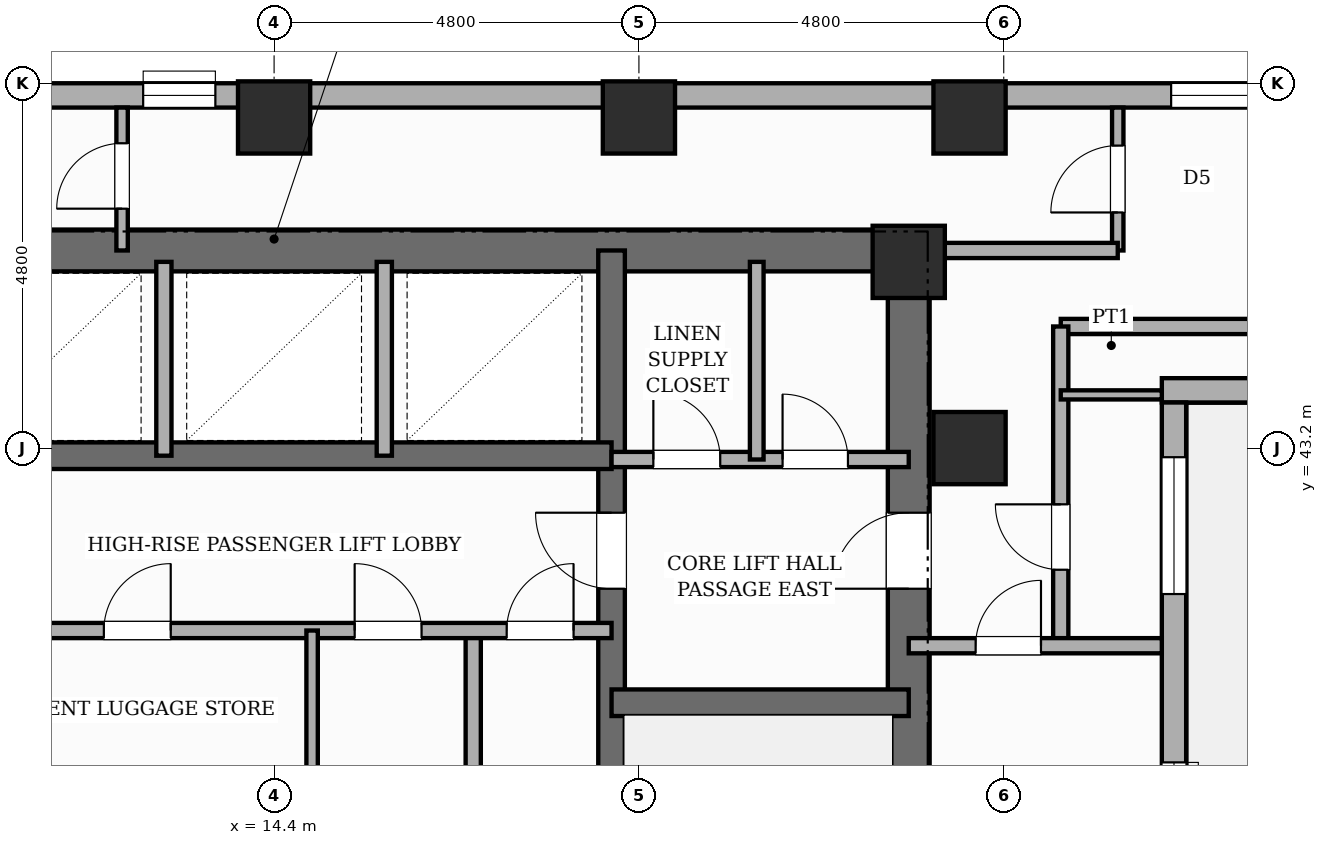
"""IFC4 building model, lengths in metres.
Left out: names, types, materials, properties, quantities, classifications, styles, units other than length and angle.
Written with IfcOpenShell. Run it as: python <this file> out.ifc"""

import sys

from ifc_helpers import new_model, si_unit, direction, frame, frame_2d, origin, origin_2d, place, context, subcontext, project, spatial, rectangle, extrude, element, fill, save


model = new_model("IFC4")
c1 = context("Model", 3, precision=1e-05, world=origin(), true_north=direction((0.0, 1.0)))
c2 = subcontext(c1, "Body", "Model", "MODEL_VIEW")
j1 = project(units=[si_unit("LENGTHUNIT", "METRE"), si_unit("PLANEANGLEUNIT", "RADIAN")], contexts=[c1])
p1 = place(None, origin())
s1 = spatial("IfcSite", under=j1, at=p1, CompositionType="ELEMENT")
p2 = place(p1, origin())
s2 = spatial("IfcBuilding", under=s1, at=p2, CompositionType="ELEMENT")
p3 = place(p2, frame((0.0, 0.0, 154.0)))
s3 = spatial("IfcBuildingStorey", under=s2, at=p3, CompositionType="ELEMENT", Elevation=154.0)
p4 = place(p3, frame((22.75, 30.625, 0.0), z_axis=(0.0, 0.0, 1.0), x_axis=(0.0, 1.0, 0.0)))
e1 = element("IfcWall", 1, at=p4, inside=s3, PredefinedType="SHEAR", context=c2, shape_type="SweptSolid", body=[
    extrude(rectangle(XDim=15.45, YDim=0.55, at=frame_2d((7.725, 0.0))), origin(), (0.0, 0.0, 1.0), 3.6),
])
p5 = place(p4, frame((10.725, 0.0, 0.0)))
e2 = element("IfcOpeningElement", 2, at=p5, cuts=e1, PredefinedType="OPENING", context=c2, shape_type="SweptSolid", body=[
    extrude(rectangle(XDim=1.0, YDim=2.15, at=frame_2d((0.5, 1.075))), frame((0.0, 0.285, 0.0), z_axis=(0.0, -1.0, 0.0), x_axis=(1.0, 0.0, 0.0)), (0.0, 0.0, 1.0), 0.57),
])
p6 = place(p3, frame((6.05, 45.8, 0.0), z_axis=(0.0, 0.0, 1.0), x_axis=(1.0, 0.0, 0.0)))
e3 = element("IfcWall", 3, at=p6, inside=s3, PredefinedType="SHEAR", context=c2, shape_type="SweptSolid", body=[
    extrude(rectangle(XDim=16.7, YDim=0.55, at=frame_2d((8.35, 0.0))), origin(), (0.0, 0.0, 1.0), 3.6),
])
p7 = place(p3, frame((18.84, 30.9, 0.0), z_axis=(0.0, 0.0, 1.0), x_axis=(0.0, 1.0, 0.0)))
e4 = element("IfcWall", 4, at=p7, inside=s3, PredefinedType="SHEAR", context=c2, shape_type="SweptSolid", body=[
    extrude(rectangle(XDim=14.9, YDim=0.35, at=frame_2d((7.45, 0.0))), origin(), (0.0, 0.0, 1.0), 3.6),
])
p8 = place(p7, frame((0.65, 0.0, 0.0)))
e5 = element("IfcOpeningElement", 5, at=p8, cuts=e4, PredefinedType="OPENING", context=c2, shape_type="SweptSolid", body=[
    extrude(rectangle(XDim=0.95, YDim=2.1, at=frame_2d((0.475, 1.05))), frame((0.0, 0.185, 0.0), z_axis=(0.0, -1.0, 0.0), x_axis=(1.0, 0.0, 0.0)), (0.0, 0.0, 1.0), 0.37),
])
p9 = place(p7, frame((10.45, 0.0, 0.0)))
e6 = element("IfcOpeningElement", 6, at=p9, cuts=e4, PredefinedType="OPENING", context=c2, shape_type="SweptSolid", body=[
    extrude(rectangle(XDim=1.0, YDim=2.15, at=frame_2d((0.5, 1.075))), frame((0.0, 0.185, 0.0), z_axis=(0.0, -1.0, 0.0), x_axis=(1.0, 0.0, 0.0)), (0.0, 0.0, 1.0), 0.37),
])
p10 = place(p3, frame((18.84, 39.85, 0.0), z_axis=(0.0, 0.0, 1.0), x_axis=(1.0, 0.0, 0.0)))
e7 = element("IfcWall", 7, at=p10, inside=s3, PredefinedType="SHEAR", context=c2, shape_type="SweptSolid", body=[
    extrude(rectangle(XDim=3.91, YDim=0.35, at=frame_2d((1.955, 0.0))), origin(), (0.0, 0.0, 1.0), 3.6),
])
p11 = place(p3, frame((9.96, 43.1, 0.0), z_axis=(0.0, 0.0, 1.0), x_axis=(1.0, 0.0, 0.0)))
e8 = element("IfcWall", 8, at=p11, inside=s3, PredefinedType="SHEAR", context=c2, shape_type="SweptSolid", body=[
    extrude(rectangle(XDim=8.88, YDim=0.35, at=frame_2d((4.44, 0.0))), origin(), (0.0, 0.0, 1.0), 3.6),
])
for number, where, z_axis, x_axis in (
    (9, (14.4, 47.55, 0.0), (0.0, 0.0, 1.0), (1.0, 0.0, 0.0)),
    (10, (19.2, 47.55, 0.0), (0.0, 0.0, 1.0), (1.0, 0.0, 0.0)),
    (11, (22.75, 45.65, 0.0), (0.0, 0.0, 1.0), (1.0, 0.0, 0.0)),
    (12, (23.55, 43.2, 0.0), (0.0, 0.0, 1.0), (1.0, 0.0, 0.0)),
    (13, (23.55, 47.55, 0.0), (0.0, 0.0, 1.0), (1.0, 0.0, 0.0)),
):
    element("IfcColumn", number, at=place(p3, frame(where, z_axis=z_axis, x_axis=x_axis)), inside=s3, PredefinedType="COLUMN", context=c2, shape_type="SweptSolid", body=[
        extrude(rectangle(XDim=0.95, YDim=0.95, at=origin_2d()), origin(), (0.0, 0.0, 1.0), 3.6),
    ])
p12 = place(p3, frame((7.2, 47.84, 0.0), z_axis=(0.0, 0.0, 1.0), x_axis=(1.0, 0.0, 0.0)))
e14 = element("IfcWall", 14, at=p12, inside=s3, PredefinedType="STANDARD", context=c2, shape_type="SweptSolid", body=[
    extrude(rectangle(XDim=43.2, YDim=0.32, at=frame_2d((21.6, 0.0))), origin(), (0.0, 0.0, 1.0), 2.54),
])
p13 = place(p12, frame((19.002, 0.0, 0.65)))
e15 = element("IfcOpeningElement", 15, at=p13, cuts=e14, PredefinedType="OPENING", context=c2, shape_type="SweptSolid", body=[
    extrude(rectangle(XDim=1.4, YDim=1.1, at=frame_2d((0.7, 0.55))), frame((0.0, 0.17, 0.0), z_axis=(0.0, -1.0, 0.0), x_axis=(1.0, 0.0, 0.0)), (0.0, 0.0, 1.0), 0.34),
])
p14 = place(p12, frame((0.282, 0.0, 0.65)))
e16 = element("IfcOpeningElement", 16, at=p14, cuts=e14, PredefinedType="OPENING", context=c2, shape_type="SweptSolid", body=[
    extrude(rectangle(XDim=1.4, YDim=1.1, at=frame_2d((0.7, 0.55))), frame((0.0, 0.17, 0.0), z_axis=(0.0, -1.0, 0.0), x_axis=(1.0, 0.0, 0.0)), (0.0, 0.0, 1.0), 0.34),
])
p15 = place(p12, frame((5.478, 0.0, 0.45)))
e17 = element("IfcOpeningElement", 17, at=p15, cuts=e14, PredefinedType="OPENING", context=c2, shape_type="SweptSolid", body=[
    extrude(rectangle(XDim=0.95, YDim=1.8, at=frame_2d((0.475, 0.9))), frame((0.0, 0.17, 0.0), z_axis=(0.0, -1.0, 0.0), x_axis=(1.0, 0.0, 0.0)), (0.0, 0.0, 1.0), 0.34),
])
p16 = place(p3, frame((38.4, 43.96, 0.0), z_axis=(0.0, 0.0, 1.0), x_axis=(-1.0, 0.0, 0.0)))
e18 = element("IfcWall", 18, at=p16, inside=s3, PredefinedType="STANDARD", context=c2, shape_type="SweptSolid", body=[
    extrude(rectangle(XDim=12.32, YDim=0.32, at=frame_2d((6.16, 0.0))), origin(), (0.0, 0.0, 1.0), 3.36),
])
p17 = place(p16, frame((5.26, 0.0, 0.8)))
e19 = element("IfcOpeningElement", 19, at=p17, cuts=e18, PredefinedType="OPENING", context=c2, shape_type="SweptSolid", body=[
    extrude(rectangle(XDim=1.8, YDim=2.1, at=frame_2d((0.9, 1.05))), frame((0.0, 0.17, 0.0), z_axis=(0.0, -1.0, 0.0), x_axis=(1.0, 0.0, 0.0)), (0.0, 0.0, 1.0), 0.34),
])
p18 = place(p3, frame((26.24, 43.8, 0.0), z_axis=(0.0, 0.0, 1.0), x_axis=(0.0, -1.0, 0.0)))
e20 = element("IfcWall", 20, at=p18, inside=s3, PredefinedType="STANDARD", context=c2, shape_type="SweptSolid", body=[
    extrude(rectangle(XDim=15.0, YDim=0.32, at=frame_2d((7.5, 0.0))), origin(), (0.0, 0.0, 1.0), 3.36),
])
p19 = place(p18, frame((8.15, 0.0, 0.0)))
e21 = element("IfcOpeningElement", 21, at=p19, cuts=e20, PredefinedType="OPENING", context=c2, shape_type="SweptSolid", body=[
    extrude(rectangle(XDim=1.3, YDim=2.2, at=frame_2d((0.65, 1.1))), frame((0.0, 0.17, 0.0), z_axis=(0.0, -1.0, 0.0), x_axis=(1.0, 0.0, 0.0)), (0.0, 0.0, 1.0), 0.34),
])
p20 = place(p18, frame((4.735, 0.0, 0.8)))
e22 = element("IfcOpeningElement", 22, at=p20, cuts=e20, PredefinedType="OPENING", context=c2, shape_type="SweptSolid", body=[
    extrude(rectangle(XDim=1.8, YDim=2.1, at=frame_2d((0.9, 1.05))), frame((0.0, 0.17, 0.0), z_axis=(0.0, -1.0, 0.0), x_axis=(1.0, 0.0, 0.0)), (0.0, 0.0, 1.0), 0.34),
])
p21 = place(p18, frame((0.72, 0.0, 0.8)))
e23 = element("IfcOpeningElement", 23, at=p21, cuts=e20, PredefinedType="OPENING", context=c2, shape_type="SweptSolid", body=[
    extrude(rectangle(XDim=1.8, YDim=2.1, at=frame_2d((0.9, 1.05))), frame((0.0, 0.17, 0.0), z_axis=(0.0, -1.0, 0.0), x_axis=(1.0, 0.0, 0.0)), (0.0, 0.0, 1.0), 0.34),
])
p22 = place(p3, frame((17.02, 35.65, 0.0), z_axis=(0.0, 0.0, 1.0), x_axis=(0.0, 1.0, 0.0)))
e24 = element("IfcWall", 24, at=p22, inside=s3, PredefinedType="POLYGONAL", context=c2, shape_type="SweptSolid", body=[
    extrude(rectangle(XDim=5.15, YDim=0.2, at=frame_2d((2.575, 0.0))), origin(), (0.0, 0.0, 1.0), 3.36),
])
p23 = place(p3, frame((9.96, 40.8, 0.0), z_axis=(0.0, 0.0, 1.0), x_axis=(1.0, 0.0, 0.0)))
e25 = element("IfcWall", 25, at=p23, inside=s3, PredefinedType="POLYGONAL", context=c2, shape_type="SweptSolid", body=[
    extrude(rectangle(XDim=8.88, YDim=0.2, at=frame_2d((4.44, 0.0))), origin(), (0.0, 0.0, 1.0), 3.36),
])
p24 = place(p23, frame((7.5, 0.0, 0.0)))
e26 = element("IfcOpeningElement", 26, at=p24, cuts=e25, PredefinedType="OPENING", context=c2, shape_type="SweptSolid", body=[
    extrude(rectangle(XDim=0.88, YDim=2.1, at=frame_2d((0.44, 1.05))), frame((0.0, 0.11, 0.0), z_axis=(0.0, -1.0, 0.0), x_axis=(1.0, 0.0, 0.0)), (0.0, 0.0, 1.0), 0.22),
])
p25 = place(p23, frame((2.2, 0.0, 0.0)))
e27 = element("IfcOpeningElement", 27, at=p25, cuts=e25, PredefinedType="OPENING", context=c2, shape_type="SweptSolid", body=[
    extrude(rectangle(XDim=0.88, YDim=2.1, at=frame_2d((0.44, 1.05))), frame((0.0, 0.11, 0.0), z_axis=(0.0, -1.0, 0.0), x_axis=(1.0, 0.0, 0.0)), (0.0, 0.0, 1.0), 0.22),
])
p26 = place(p23, frame((5.5, 0.0, 0.0)))
e28 = element("IfcOpeningElement", 28, at=p26, cuts=e25, PredefinedType="OPENING", context=c2, shape_type="SweptSolid", body=[
    extrude(rectangle(XDim=0.88, YDim=2.1, at=frame_2d((0.44, 1.05))), frame((0.0, 0.11, 0.0), z_axis=(0.0, -1.0, 0.0), x_axis=(1.0, 0.0, 0.0)), (0.0, 0.0, 1.0), 0.22),
])
p27 = place(p3, frame((18.84, 43.05, 0.0), z_axis=(0.0, 0.0, 1.0), x_axis=(1.0, 0.0, 0.0)))
e29 = element("IfcWall", 29, at=p27, inside=s3, PredefinedType="POLYGONAL", context=c2, shape_type="SweptSolid", body=[
    extrude(rectangle(XDim=3.91, YDim=0.2, at=frame_2d((1.955, 0.0))), origin(), (0.0, 0.0, 1.0), 2.54),
])
p28 = place(p27, frame((0.55, 0.0, 0.0)))
e30 = element("IfcOpeningElement", 30, at=p28, cuts=e29, PredefinedType="OPENING", context=c2, shape_type="SweptSolid", body=[
    extrude(rectangle(XDim=0.88, YDim=2.1, at=frame_2d((0.44, 1.05))), frame((0.0, 0.11, 0.0), z_axis=(0.0, -1.0, 0.0), x_axis=(1.0, 0.0, 0.0)), (0.0, 0.0, 1.0), 0.22),
])
p29 = place(p27, frame((2.25, 0.0, 0.0)))
e31 = element("IfcOpeningElement", 31, at=p29, cuts=e29, PredefinedType="OPENING", context=c2, shape_type="SweptSolid", body=[
    extrude(rectangle(XDim=0.86, YDim=2.1, at=frame_2d((0.43, 1.05))), frame((0.0, 0.11, 0.0), z_axis=(0.0, -1.0, 0.0), x_axis=(1.0, 0.0, 0.0)), (0.0, 0.0, 1.0), 0.22),
])
for number, where, z_axis, x_axis in (
    (32, (12.95, 43.1, 0.0), (0.0, 0.0, 1.0), (0.0, 1.0, 0.0)),
    (33, (15.85, 43.1, 0.0), (0.0, 0.0, 1.0), (0.0, 1.0, 0.0)),
):
    element("IfcWall", number, at=place(p3, frame(where, z_axis=z_axis, x_axis=x_axis)), inside=s3, PredefinedType="POLYGONAL", context=c2, shape_type="SweptSolid", body=[
        extrude(rectangle(XDim=2.55, YDim=0.2, at=frame_2d((1.275, 0.0))), origin(), (0.0, 0.0, 1.0), 3.36),
    ])
p30 = place(p3, frame((14.9, 38.72, 0.0), z_axis=(0.0, 0.0, 1.0), x_axis=(0.0, 1.0, 0.0)))
e34 = element("IfcWall", 34, at=p30, inside=s3, PredefinedType="PARTITIONING", context=c2, shape_type="SweptSolid", body=[
    extrude(rectangle(XDim=2.08, YDim=0.15, at=frame_2d((1.04, 0.0))), origin(), (0.0, 0.0, 1.0), 3.36),
])
p31 = place(p3, frame((20.75, 43.05, 0.0), z_axis=(0.0, 0.0, 1.0), x_axis=(0.0, 1.0, 0.0)))
e35 = element("IfcWall", 35, at=p31, inside=s3, PredefinedType="PLUMBINGWALL", context=c2, shape_type="SweptSolid", body=[
    extrude(rectangle(XDim=2.6, YDim=0.18, at=frame_2d((1.3, 0.0))), origin(), (0.0, 0.0, 1.0), 3.36),
])
p32 = place(p3, frame((25.5, 45.8, 0.0), z_axis=(0.0, 0.0, 1.0), x_axis=(0.0, 1.0, 0.0)))
e36 = element("IfcWall", 36, at=p32, inside=s3, PredefinedType="PARTITIONING", context=c2, shape_type="SweptSolid", body=[
    extrude(rectangle(XDim=1.88, YDim=0.15, at=frame_2d((0.94, 0.0))), origin(), (0.0, 0.0, 1.0), 3.36),
])
p33 = place(p32, frame((0.5, 0.0, 0.0)))
e37 = element("IfcOpeningElement", 37, at=p33, cuts=e36, PredefinedType="OPENING", context=c2, shape_type="SweptSolid", body=[
    extrude(rectangle(XDim=0.88, YDim=2.1, at=frame_2d((0.44, 1.05))), frame((0.0, 0.085, 0.0), z_axis=(0.0, -1.0, 0.0), x_axis=(1.0, 0.0, 0.0)), (0.0, 0.0, 1.0), 0.17),
])
p34 = place(p3, frame((22.75, 45.8, 0.0), z_axis=(0.0, 0.0, 1.0), x_axis=(1.0, 0.0, 0.0)))
e38 = element("IfcWall", 38, at=p34, inside=s3, PredefinedType="PARTITIONING", context=c2, shape_type="SweptSolid", body=[
    extrude(rectangle(XDim=2.75, YDim=0.2, at=frame_2d((1.375, 0.0))), origin(), (0.0, 0.0, 1.0), 3.36),
])
p35 = place(p3, frame((12.4, 45.8, 0.0), z_axis=(0.0, 0.0, 1.0), x_axis=(0.0, 1.0, 0.0)))
e39 = element("IfcWall", 39, at=p35, inside=s3, PredefinedType="PARTITIONING", context=c2, shape_type="SweptSolid", body=[
    extrude(rectangle(XDim=1.88, YDim=0.15, at=frame_2d((0.94, 0.0))), origin(), (0.0, 0.0, 1.0), 3.36),
])
p36 = place(p35, frame((0.55, 0.0, 0.0)))
e40 = element("IfcOpeningElement", 40, at=p36, cuts=e39, PredefinedType="OPENING", context=c2, shape_type="SweptSolid", body=[
    extrude(rectangle(XDim=0.86, YDim=2.1, at=frame_2d((0.43, 1.05))), frame((0.0, 0.085, 0.0), z_axis=(0.0, -1.0, 0.0), x_axis=(1.0, 0.0, 0.0)), (0.0, 0.0, 1.0), 0.17),
])
p37 = place(p3, frame((24.75, 44.8, 0.0), z_axis=(0.0, 0.0, 1.0), x_axis=(1.0, 0.0, 0.0)))
e41 = element("IfcWall", 41, at=p37, inside=s3, PredefinedType="PARTITIONING", context=c2, shape_type="SweptSolid", body=[
    extrude(rectangle(XDim=17.3, YDim=0.2, at=frame_2d((8.65, 0.0))), origin(), (0.0, 0.0, 1.0), 3.36),
])
p38 = place(p37, frame((6.2, 0.0, 0.0)))
e42 = element("IfcOpeningElement", 42, at=p38, cuts=e41, PredefinedType="OPENING", context=c2, shape_type="SweptSolid", body=[
    extrude(rectangle(XDim=0.95, YDim=2.15, at=frame_2d((0.475, 1.075))), frame((0.0, 0.11, 0.0), z_axis=(0.0, -1.0, 0.0), x_axis=(1.0, 0.0, 0.0)), (0.0, 0.0, 1.0), 0.22),
])
p39 = place(p3, frame((24.75, 40.6, 0.0), z_axis=(0.0, 0.0, 1.0), x_axis=(0.0, 1.0, 0.0)))
e43 = element("IfcWall", 43, at=p39, inside=s3, PredefinedType="PARTITIONING", context=c2, shape_type="SweptSolid", body=[
    extrude(rectangle(XDim=4.2, YDim=0.2, at=frame_2d((2.1, 0.0))), origin(), (0.0, 0.0, 1.0), 3.36),
])
p40 = place(p39, frame((1.0, 0.0, 0.0)))
e44 = element("IfcOpeningElement", 44, at=p40, cuts=e43, PredefinedType="OPENING", context=c2, shape_type="SweptSolid", body=[
    extrude(rectangle(XDim=0.86, YDim=2.1, at=frame_2d((0.43, 1.05))), frame((0.0, 0.11, 0.0), z_axis=(0.0, -1.0, 0.0), x_axis=(1.0, 0.0, 0.0)), (0.0, 0.0, 1.0), 0.22),
])
p41 = place(p3, frame((24.75, 43.9, 0.0), z_axis=(0.0, 0.0, 1.0), x_axis=(1.0, 0.0, 0.0)))
e45 = element("IfcWall", 45, at=p41, inside=s3, PredefinedType="PARTITIONING", context=c2, shape_type="SweptSolid", body=[
    extrude(rectangle(XDim=1.33, YDim=0.12, at=frame_2d((0.665, 0.0))), origin(), (0.0, 0.0, 1.0), 3.36),
])
p42 = place(p3, frame((22.75, 40.6, 0.0), z_axis=(0.0, 0.0, 1.0), x_axis=(1.0, 0.0, 0.0)))
e46 = element("IfcWall", 46, at=p42, inside=s3, PredefinedType="PARTITIONING", context=c2, shape_type="SweptSolid", body=[
    extrude(rectangle(XDim=3.33, YDim=0.2, at=frame_2d((1.665, 0.0))), origin(), (0.0, 0.0, 1.0), 3.36),
])
p43 = place(p42, frame((0.88, 0.0, 0.0)))
e47 = element("IfcOpeningElement", 47, at=p43, cuts=e46, PredefinedType="OPENING", context=c2, shape_type="SweptSolid", body=[
    extrude(rectangle(XDim=0.86, YDim=2.1, at=frame_2d((0.43, 1.05))), frame((0.0, 0.11, 0.0), z_axis=(0.0, -1.0, 0.0), x_axis=(1.0, 0.0, 0.0)), (0.0, 0.0, 1.0), 0.22),
])
p44 = place(p13, origin())
e48 = element("IfcWindow", 48, at=p44, inside=s3, PartitioningType="SINGLE_PANEL", PredefinedType="WINDOW", context=c2, shape_type="SweptSolid", body=[
    extrude(rectangle(XDim=1.4, YDim=1.1, at=frame_2d((0.7, 0.55))), frame((0.0, 0.03, 0.0), z_axis=(0.0, -1.0, 0.0), x_axis=(1.0, 0.0, 0.0)), (0.0, 0.0, 1.0), 0.06),
])
fill(e15, e48)
p45 = place(p15, origin())
e49 = element("IfcWindow", 49, at=p45, inside=s3, PartitioningType="SINGLE_PANEL", PredefinedType="WINDOW", context=c2, shape_type="SweptSolid", body=[
    extrude(rectangle(XDim=0.95, YDim=1.8, at=frame_2d((0.475, 0.9))), frame((0.0, 0.03, 0.0), z_axis=(0.0, -1.0, 0.0), x_axis=(1.0, 0.0, 0.0)), (0.0, 0.0, 1.0), 0.06),
])
fill(e17, e49)
p46 = place(p20, origin())
e50 = element("IfcWindow", 50, at=p46, inside=s3, PartitioningType="SINGLE_PANEL", PredefinedType="WINDOW", context=c2, shape_type="SweptSolid", body=[
    extrude(rectangle(XDim=1.8, YDim=2.1, at=frame_2d((0.9, 1.05))), frame((0.0, 0.03, 0.0), z_axis=(0.0, -1.0, 0.0), x_axis=(1.0, 0.0, 0.0)), (0.0, 0.0, 1.0), 0.06),
])
fill(e22, e50)
p47 = place(p21, origin())
e51 = element("IfcWindow", 51, at=p47, inside=s3, PartitioningType="SINGLE_PANEL", PredefinedType="WINDOW", context=c2, shape_type="SweptSolid", body=[
    extrude(rectangle(XDim=1.8, YDim=2.1, at=frame_2d((0.9, 1.05))), frame((0.0, 0.03, 0.0), z_axis=(0.0, -1.0, 0.0), x_axis=(1.0, 0.0, 0.0)), (0.0, 0.0, 1.0), 0.06),
])
fill(e23, e51)
p48 = place(p24, origin())
e52 = element("IfcDoor", 52, at=p48, inside=s3, OperationType="SINGLE_SWING_RIGHT", PredefinedType="DOOR", context=c2, shape_type="SweptSolid", body=[
    extrude(rectangle(XDim=0.88, YDim=2.1, at=frame_2d((0.44, 1.05))), frame((0.0, 0.025, 0.0), z_axis=(0.0, -1.0, 0.0), x_axis=(1.0, 0.0, 0.0)), (0.0, 0.0, 1.0), 0.05),
])
fill(e26, e52)
p49 = place(p9, origin())
e53 = element("IfcDoor", 53, at=p49, inside=s3, OperationType="SINGLE_SWING_RIGHT", PredefinedType="DOOR", context=c2, shape_type="SweptSolid", body=[
    extrude(rectangle(XDim=1.0, YDim=2.15, at=frame_2d((0.5, 1.075))), frame((0.0, 0.025, 0.0), z_axis=(0.0, -1.0, 0.0), x_axis=(1.0, 0.0, 0.0)), (0.0, 0.0, 1.0), 0.05),
])
fill(e6, e53)
p50 = place(p5, origin())
e54 = element("IfcDoor", 54, at=p50, inside=s3, OperationType="SINGLE_SWING_LEFT", PredefinedType="DOOR", context=c2, shape_type="SweptSolid", body=[
    extrude(rectangle(XDim=1.0, YDim=2.15, at=frame_2d((0.5, 1.075))), frame((0.0, 0.025, 0.0), z_axis=(0.0, -1.0, 0.0), x_axis=(1.0, 0.0, 0.0)), (0.0, 0.0, 1.0), 0.05),
])
fill(e2, e54)
p51 = place(p25, origin())
e55 = element("IfcDoor", 55, at=p51, inside=s3, OperationType="SINGLE_SWING_RIGHT", PredefinedType="DOOR", context=c2, shape_type="SweptSolid", body=[
    extrude(rectangle(XDim=0.88, YDim=2.1, at=frame_2d((0.44, 1.05))), frame((0.0, 0.025, 0.0), z_axis=(0.0, -1.0, 0.0), x_axis=(1.0, 0.0, 0.0)), (0.0, 0.0, 1.0), 0.05),
])
fill(e27, e55)
p52 = place(p26, origin())
e56 = element("IfcDoor", 56, at=p52, inside=s3, OperationType="SINGLE_SWING_LEFT", PredefinedType="DOOR", context=c2, shape_type="SweptSolid", body=[
    extrude(rectangle(XDim=0.88, YDim=2.1, at=frame_2d((0.44, 1.05))), frame((0.0, 0.025, 0.0), z_axis=(0.0, -1.0, 0.0), x_axis=(1.0, 0.0, 0.0)), (0.0, 0.0, 1.0), 0.05),
])
fill(e28, e56)
p53 = place(p28, origin())
e57 = element("IfcDoor", 57, at=p53, inside=s3, OperationType="SINGLE_SWING_LEFT", PredefinedType="DOOR", context=c2, shape_type="SweptSolid", body=[
    extrude(rectangle(XDim=0.88, YDim=2.1, at=frame_2d((0.44, 1.05))), frame((0.0, 0.025, 0.0), z_axis=(0.0, -1.0, 0.0), x_axis=(1.0, 0.0, 0.0)), (0.0, 0.0, 1.0), 0.05),
])
fill(e30, e57)
p54 = place(p29, origin())
e58 = element("IfcDoor", 58, at=p54, inside=s3, OperationType="SINGLE_SWING_LEFT", PredefinedType="DOOR", context=c2, shape_type="SweptSolid", body=[
    extrude(rectangle(XDim=0.86, YDim=2.1, at=frame_2d((0.43, 1.05))), frame((0.0, 0.025, 0.0), z_axis=(0.0, -1.0, 0.0), x_axis=(1.0, 0.0, 0.0)), (0.0, 0.0, 1.0), 0.05),
])
fill(e31, e58)
p55 = place(p33, origin())
e59 = element("IfcDoor", 59, at=p55, inside=s3, OperationType="SINGLE_SWING_LEFT", PredefinedType="DOOR", context=c2, shape_type="SweptSolid", body=[
    extrude(rectangle(XDim=0.88, YDim=2.1, at=frame_2d((0.44, 1.05))), frame((0.0, 0.025, 0.0), z_axis=(0.0, -1.0, 0.0), x_axis=(1.0, 0.0, 0.0)), (0.0, 0.0, 1.0), 0.05),
])
fill(e37, e59)
p56 = place(p36, origin())
e60 = element("IfcDoor", 60, at=p56, inside=s3, OperationType="SINGLE_SWING_LEFT", PredefinedType="DOOR", context=c2, shape_type="SweptSolid", body=[
    extrude(rectangle(XDim=0.86, YDim=2.1, at=frame_2d((0.43, 1.05))), frame((0.0, 0.025, 0.0), z_axis=(0.0, -1.0, 0.0), x_axis=(1.0, 0.0, 0.0)), (0.0, 0.0, 1.0), 0.05),
])
fill(e40, e60)
p57 = place(p40, origin())
e61 = element("IfcDoor", 61, at=p57, inside=s3, OperationType="SINGLE_SWING_RIGHT", PredefinedType="DOOR", context=c2, shape_type="SweptSolid", body=[
    extrude(rectangle(XDim=0.86, YDim=2.1, at=frame_2d((0.43, 1.05))), frame((0.0, 0.025, 0.0), z_axis=(0.0, -1.0, 0.0), x_axis=(1.0, 0.0, 0.0)), (0.0, 0.0, 1.0), 0.05),
])
fill(e44, e61)
p58 = place(p43, origin())
e62 = element("IfcDoor", 62, at=p58, inside=s3, OperationType="SINGLE_SWING_RIGHT", PredefinedType="DOOR", context=c2, shape_type="SweptSolid", body=[
    extrude(rectangle(XDim=0.86, YDim=2.1, at=frame_2d((0.43, 1.05))), frame((0.0, 0.025, 0.0), z_axis=(0.0, -1.0, 0.0), x_axis=(1.0, 0.0, 0.0)), (0.0, 0.0, 1.0), 0.05),
])
fill(e47, e62)
save(model, sys.argv[1])
